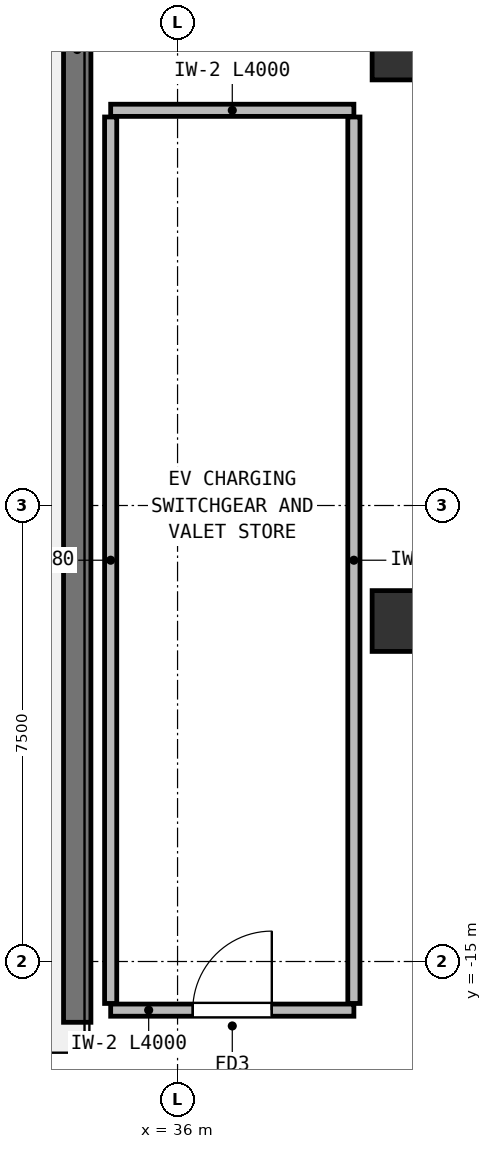
"""IFC4 building model, lengths in metres.
Left out: names, types, materials, properties, quantities, classifications, styles, units other than length and angle.
Written with IfcOpenShell. Run it as: python <this file> out.ifc"""

import sys

from ifc_helpers import new_model, si_unit, direction, frame, frame_2d, origin, origin_2d, place, context, subcontext, project, spatial, rectangle, extrude, element, fill, save


model = new_model("IFC4")
c1 = context("Model", 3, precision=1e-05, world=origin(), true_north=direction((0.0, 1.0)))
c2 = subcontext(c1, "Body", "Model", "MODEL_VIEW")
j1 = project(units=[si_unit("LENGTHUNIT", "METRE"), si_unit("PLANEANGLEUNIT", "RADIAN")], contexts=[c1])
p1 = place(None, origin())
s1 = spatial("IfcSite", under=j1, at=p1, CompositionType="ELEMENT")
p2 = place(p1, origin())
s2 = spatial("IfcBuilding", under=s1, at=p2, CompositionType="ELEMENT")
p3 = place(p2, frame((0.0, 0.0, -4.5)))
s3 = spatial("IfcBuildingStorey", under=s2, at=p3, CompositionType="ELEMENT", Elevation=-4.5)
p4 = place(p3, frame((34.35, -16.0, 0.0), z_axis=(0.0, 0.0, 1.0), x_axis=(0.0, 1.0, 0.0)))
e1 = element("IfcWall", 1, at=p4, inside=s3, PredefinedType="SHEAR", context=c2, shape_type="SweptSolid", body=[
    extrude(rectangle(XDim=32.0, YDim=0.45, at=frame_2d((16.0, 0.0))), origin(), (0.0, 0.0, 1.0), 1.97),
])
for number, where, z_axis, x_axis in (
    (2, (39.6, -9.4, 0.0), (0.0, 0.0, 1.0), (1.0, 0.0, 0.0)),
    (3, (39.6, 0.0, 0.0), (0.0, 0.0, 1.0), (1.0, 0.0, 0.0)),
):
    element("IfcColumn", number, at=place(p3, frame(where, z_axis=z_axis, x_axis=x_axis)), inside=s3, PredefinedType="COLUMN", context=c2, shape_type="SweptSolid", body=[
        extrude(rectangle(XDim=0.8, YDim=1.0, at=origin_2d()), origin(), (0.0, 0.0, 1.0), 4.5),
    ])
p5 = place(p3, frame((34.9, -1.0, 0.0), z_axis=(0.0, 0.0, 1.0), x_axis=(1.0, 0.0, 0.0)))
e4 = element("IfcWall", 4, at=p5, inside=s3, PredefinedType="PARTITIONING", context=c2, shape_type="SweptSolid", body=[
    extrude(rectangle(XDim=4.0, YDim=0.2, at=frame_2d((2.0, 0.0))), origin(), (0.0, 0.0, 1.0), 4.22),
])
p6 = place(p3, frame((34.9, -15.8, 0.0), z_axis=(0.0, 0.0, 1.0), x_axis=(1.0, 0.0, 0.0)))
e5 = element("IfcWall", 5, at=p6, inside=s3, PredefinedType="PARTITIONING", context=c2, shape_type="SweptSolid", body=[
    extrude(rectangle(XDim=4.0, YDim=0.2, at=frame_2d((2.0, 0.0))), origin(), (0.0, 0.0, 1.0), 4.22),
])
p7 = place(p6, frame((1.35, 0.0, 0.0)))
e6 = element("IfcOpeningElement", 6, at=p7, cuts=e5, PredefinedType="OPENING", context=c2, shape_type="SweptSolid", body=[
    extrude(rectangle(XDim=1.3, YDim=2.15, at=frame_2d((0.65, 1.075))), frame((0.0, 0.11, 0.0), z_axis=(0.0, -1.0, 0.0), x_axis=(1.0, 0.0, 0.0)), (0.0, 0.0, 1.0), 0.22),
])
for number, where, z_axis, x_axis in (
    (7, (34.9, -1.11, 0.0), (0.0, 0.0, 1.0), (0.0, -1.0, 0.0)),
    (8, (38.9, -15.69, 0.0), (0.0, 0.0, 1.0), (0.0, 1.0, 0.0)),
):
    element("IfcWall", number, at=place(p3, frame(where, z_axis=z_axis, x_axis=x_axis)), inside=s3, PredefinedType="PARTITIONING", context=c2, shape_type="SweptSolid", body=[
        extrude(rectangle(XDim=14.58, YDim=0.2, at=frame_2d((7.29, 0.0))), origin(), (0.0, 0.0, 1.0), 4.22),
    ])
p8 = place(p7, origin())
e9 = element("IfcDoor", 9, at=p8, inside=s3, OperationType="SINGLE_SWING_RIGHT", PredefinedType="DOOR", context=c2, shape_type="SweptSolid", body=[
    extrude(rectangle(XDim=1.3, YDim=2.15, at=frame_2d((0.65, 1.075))), frame((0.0, 0.025, 0.0), z_axis=(0.0, -1.0, 0.0), x_axis=(1.0, 0.0, 0.0)), (0.0, 0.0, 1.0), 0.05),
])
fill(e6, e9)
save(model, sys.argv[1])
